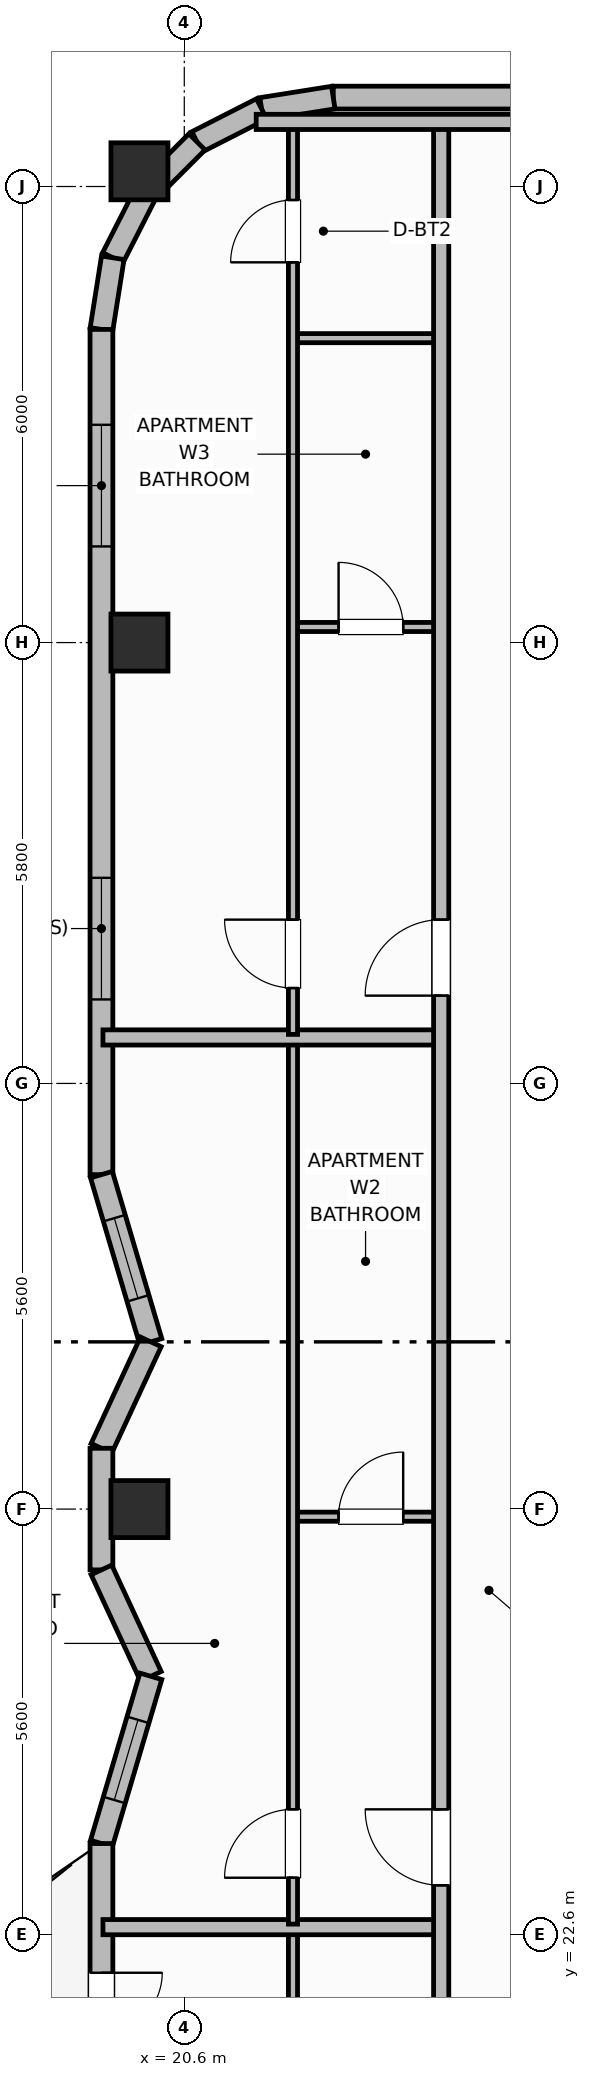
"""IFC4 building model, lengths in metres.
Left out: names, types, materials, properties, quantities, classifications, styles, units other than length and angle.
Written with IfcOpenShell. Run it as: python <this file> out.ifc"""

import sys

from ifc_helpers import new_model, si_unit, direction, frame, frame_2d, origin, origin_2d, place, context, subcontext, project, spatial, rectangle, extrude, element, fill, save


model = new_model("IFC4")
c1 = context("Model", 3, precision=1e-05, world=origin(), true_north=direction((0.0, 1.0)))
c2 = subcontext(c1, "Body", "Model", "MODEL_VIEW")
j1 = project(units=[si_unit("LENGTHUNIT", "METRE"), si_unit("PLANEANGLEUNIT", "RADIAN")], contexts=[c1])
p1 = place(None, origin())
s1 = spatial("IfcSite", under=j1, at=p1, CompositionType="ELEMENT")
p2 = place(p1, origin())
s2 = spatial("IfcBuilding", under=s1, at=p2, CompositionType="ELEMENT")
p3 = place(p2, frame((0.0, 0.0, 286.1)))
s3 = spatial("IfcBuildingStorey", under=s2, at=p3, CompositionType="ELEMENT", Elevation=286.1)
for number, where, z_axis, x_axis in (
    (1, (20.01, 28.2, 0.0), (0.0, 0.0, 1.0), (1.0, 0.0, 0.0)),
    (2, (20.01, 39.6, 0.0), (0.0, 0.0, 1.0), (1.0, 0.0, 0.0)),
    (3, (20.01, 45.8, 0.0), (0.0, 0.0, 1.0), (1.0, 0.0, 0.0)),
):
    element("IfcColumn", number, at=place(p3, frame(where, z_axis=z_axis, x_axis=x_axis)), inside=s3, PredefinedType="COLUMN", context=c2, shape_type="SweptSolid", body=[
        extrude(rectangle(XDim=0.75, YDim=0.75, at=origin_2d()), origin(), (0.0, 0.0, 1.0), 3.7),
    ])
p4 = place(p3, frame((55.84, 46.77, 0.0), z_axis=(0.0, 0.0, 1.0), x_axis=(-1.0, 0.0, 0.0)))
e4 = element("IfcWall", 4, at=p4, inside=s3, PredefinedType="SOLIDWALL", context=c2, shape_type="SweptSolid", body=[
    extrude(rectangle(XDim=33.28, YDim=0.3, at=frame_2d((16.64, 0.0))), origin(), (0.0, 0.0, 1.0), 2.73),
])
p5 = place(p4, frame((5.08, 0.0, 0.76)))
e5 = element("IfcOpeningElement", 5, at=p5, cuts=e4, PredefinedType="OPENING", context=c2, shape_type="SweptSolid", body=[
    extrude(rectangle(XDim=1.8, YDim=1.85, at=frame_2d((0.9, 0.925))), frame((0.0, 0.16, 0.0), z_axis=(0.0, -1.0, 0.0), x_axis=(1.0, 0.0, 0.0)), (0.0, 0.0, 1.0), 0.32),
])
p6 = place(p4, frame((8.633, 0.0, 0.76)))
e6 = element("IfcOpeningElement", 6, at=p6, cuts=e4, PredefinedType="OPENING", context=c2, shape_type="SweptSolid", body=[
    extrude(rectangle(XDim=1.8, YDim=1.85, at=frame_2d((0.9, 0.925))), frame((0.0, 0.16, 0.0), z_axis=(0.0, -1.0, 0.0), x_axis=(1.0, 0.0, 0.0)), (0.0, 0.0, 1.0), 0.32),
])
p7 = place(p4, frame((15.74, 0.0, 0.76)))
e7 = element("IfcOpeningElement", 7, at=p7, cuts=e4, PredefinedType="OPENING", context=c2, shape_type="SweptSolid", body=[
    extrude(rectangle(XDim=1.8, YDim=1.85, at=frame_2d((0.9, 0.925))), frame((0.0, 0.16, 0.0), z_axis=(0.0, -1.0, 0.0), x_axis=(1.0, 0.0, 0.0)), (0.0, 0.0, 1.0), 0.32),
])
p8 = place(p4, frame((22.847, 0.0, 0.76)))
e8 = element("IfcOpeningElement", 8, at=p8, cuts=e4, PredefinedType="OPENING", context=c2, shape_type="SweptSolid", body=[
    extrude(rectangle(XDim=1.8, YDim=1.85, at=frame_2d((0.9, 0.925))), frame((0.0, 0.16, 0.0), z_axis=(0.0, -1.0, 0.0), x_axis=(1.0, 0.0, 0.0)), (0.0, 0.0, 1.0), 0.32),
])
p9 = place(p4, frame((26.4, 0.0, 0.76)))
e9 = element("IfcOpeningElement", 9, at=p9, cuts=e4, PredefinedType="OPENING", context=c2, shape_type="SweptSolid", body=[
    extrude(rectangle(XDim=1.8, YDim=1.85, at=frame_2d((0.9, 0.925))), frame((0.0, 0.16, 0.0), z_axis=(0.0, -1.0, 0.0), x_axis=(1.0, 0.0, 0.0)), (0.0, 0.0, 1.0), 0.32),
])
p10 = place(p3, frame((22.56, 46.77, 0.0), z_axis=(0.0, 0.0, 1.0), x_axis=(-0.987669453596, -0.156553666304, 0.0)))
e10 = element("IfcWall", 10, at=p10, inside=s3, PredefinedType="SOLIDWALL", context=c2, shape_type="SweptSolid", body=[
    extrude(rectangle(XDim=0.954, YDim=0.3, at=frame_2d((0.477, 0.0))), origin(), (0.0, 0.0, 1.0), 2.73),
])
p11 = place(p3, frame((21.617, 46.621, 0.0), z_axis=(0.0, 0.0, 1.0), x_axis=(-0.891023873617, -0.45395644796, 0.0)))
e11 = element("IfcWall", 11, at=p11, inside=s3, PredefinedType="SOLIDWALL", context=c2, shape_type="SweptSolid", body=[
    extrude(rectangle(XDim=0.954, YDim=0.3, at=frame_2d((0.477, 0.0))), origin(), (0.0, 0.0, 1.0), 2.73),
])
p12 = place(p3, frame((20.767, 46.188, 0.0), z_axis=(0.0, 0.0, 1.0), x_axis=(-0.707106781187, -0.707106781187, 0.0)))
e12 = element("IfcWall", 12, at=p12, inside=s3, PredefinedType="SOLIDWALL", context=c2, shape_type="SweptSolid", body=[
    extrude(rectangle(XDim=0.954, YDim=0.3, at=frame_2d((0.477, 0.0))), origin(), (0.0, 0.0, 1.0), 2.73),
])
p13 = place(p3, frame((20.093, 45.513, 0.0), z_axis=(0.0, 0.0, 1.0), x_axis=(-0.454159573051, -0.890920356825, 0.0)))
e13 = element("IfcWall", 13, at=p13, inside=s3, PredefinedType="SOLIDWALL", context=c2, shape_type="SweptSolid", body=[
    extrude(rectangle(XDim=0.954, YDim=0.3, at=frame_2d((0.477, 0.0))), origin(), (0.0, 0.0, 1.0), 2.73),
])
p14 = place(p3, frame((19.659, 44.663, 0.0), z_axis=(0.0, 0.0, 1.0), x_axis=(-0.156304114255, -0.987708977314, 0.0)))
e14 = element("IfcWall", 14, at=p14, inside=s3, PredefinedType="SOLIDWALL", context=c2, shape_type="SweptSolid", body=[
    extrude(rectangle(XDim=0.954, YDim=0.3, at=frame_2d((0.477, 0.0))), origin(), (0.0, 0.0, 1.0), 2.73),
])
p15 = place(p3, frame((19.51, 43.72, 0.0), z_axis=(0.0, 0.0, 1.0), x_axis=(0.0, -1.0, 0.0)))
e15 = element("IfcWall", 15, at=p15, inside=s3, PredefinedType="SOLIDWALL", context=c2, shape_type="SweptSolid", body=[
    extrude(rectangle(XDim=11.12, YDim=0.3, at=frame_2d((5.56, 0.0))), origin(), (0.0, 0.0, 1.0), 2.73),
])
p16 = place(p15, frame((1.255, 0.0, 0.71)))
e16 = element("IfcOpeningElement", 16, at=p16, cuts=e15, PredefinedType="OPENING", context=c2, shape_type="SweptSolid", body=[
    extrude(rectangle(XDim=1.6, YDim=1.9, at=frame_2d((0.8, 0.95))), frame((0.0, 0.16, 0.0), z_axis=(0.0, -1.0, 0.0), x_axis=(1.0, 0.0, 0.0)), (0.0, 0.0, 1.0), 0.32),
])
p17 = place(p15, frame((7.215, 0.0, 0.71)))
e17 = element("IfcOpeningElement", 17, at=p17, cuts=e15, PredefinedType="OPENING", context=c2, shape_type="SweptSolid", body=[
    extrude(rectangle(XDim=1.6, YDim=1.9, at=frame_2d((0.8, 0.95))), frame((0.0, 0.16, 0.0), z_axis=(0.0, -1.0, 0.0), x_axis=(1.0, 0.0, 0.0)), (0.0, 0.0, 1.0), 0.32),
])
p18 = place(p3, frame((19.51, 32.6, 0.0), z_axis=(0.0, 0.0, 1.0), x_axis=(0.28328385701, -0.959036107953, 0.0)))
e18 = element("IfcWall", 18, at=p18, inside=s3, PredefinedType="SOLIDWALL", context=c2, shape_type="SweptSolid", body=[
    extrude(rectangle(XDim=2.294, YDim=0.3, at=frame_2d((1.147, 0.0))), origin(), (0.0, 0.0, 1.0), 2.73),
])
p19 = place(p18, frame((0.597, 0.0, 0.92)))
e19 = element("IfcOpeningElement", 19, at=p19, cuts=e18, PredefinedType="OPENING", context=c2, shape_type="SweptSolid", body=[
    extrude(rectangle(XDim=1.1, YDim=1.65, at=frame_2d((0.55, 0.825))), frame((0.0, 0.16, 0.0), z_axis=(0.0, -1.0, 0.0), x_axis=(1.0, 0.0, 0.0)), (0.0, 0.0, 1.0), 0.32),
])
p20 = place(p3, frame((20.16, 30.4, 0.0), z_axis=(0.0, 0.0, 1.0), x_axis=(-0.421083420882, -0.907021914101, 0.0)))
e20 = element("IfcWall", 20, at=p20, inside=s3, PredefinedType="SOLIDWALL", context=c2, shape_type="SweptSolid", body=[
    extrude(rectangle(XDim=1.543, YDim=0.3, at=frame_2d((0.772, 0.0))), origin(), (0.0, 0.0, 1.0), 2.73),
])
p21 = place(p3, frame((19.51, 29.0, 0.0), z_axis=(0.0, 0.0, 1.0), x_axis=(0.0, -1.0, 0.0)))
e21 = element("IfcWall", 21, at=p21, inside=s3, PredefinedType="SOLIDWALL", context=c2, shape_type="SweptSolid", body=[
    extrude(rectangle(XDim=1.6, YDim=0.3, at=frame_2d((0.8, 0.0))), origin(), (0.0, 0.0, 1.0), 2.73),
])
p22 = place(p3, frame((19.51, 27.4, 0.0), z_axis=(0.0, 0.0, 1.0), x_axis=(0.421083420882, -0.907021914101, 0.0)))
e22 = element("IfcWall", 22, at=p22, inside=s3, PredefinedType="SOLIDWALL", context=c2, shape_type="SweptSolid", body=[
    extrude(rectangle(XDim=1.543, YDim=0.3, at=frame_2d((0.772, 0.0))), origin(), (0.0, 0.0, 1.0), 2.73),
])
p23 = place(p3, frame((20.16, 26.0, 0.0), z_axis=(0.0, 0.0, 1.0), x_axis=(-0.283312771328, -0.959027566654, 0.0)))
e23 = element("IfcWall", 23, at=p23, inside=s3, PredefinedType="SOLIDWALL", context=c2, shape_type="SweptSolid", body=[
    extrude(rectangle(XDim=2.294, YDim=0.3, at=frame_2d((1.147, 0.0))), origin(), (0.0, 0.0, 1.0), 2.73),
])
p24 = place(p23, frame((0.597, 0.0, 0.92)))
e24 = element("IfcOpeningElement", 24, at=p24, cuts=e23, PredefinedType="OPENING", context=c2, shape_type="SweptSolid", body=[
    extrude(rectangle(XDim=1.1, YDim=1.65, at=frame_2d((0.55, 0.825))), frame((0.0, 0.16, 0.0), z_axis=(0.0, -1.0, 0.0), x_axis=(1.0, 0.0, 0.0)), (0.0, 0.0, 1.0), 0.32),
])
p25 = place(p3, frame((19.51, 23.8, 0.0), z_axis=(0.0, 0.0, 1.0), x_axis=(0.0, -1.0, 0.0)))
e25 = element("IfcWall", 25, at=p25, inside=s3, PredefinedType="SOLIDWALL", context=c2, shape_type="SweptSolid", body=[
    extrude(rectangle(XDim=11.12, YDim=0.3, at=frame_2d((5.56, 0.0))), origin(), (0.0, 0.0, 1.0), 2.73),
])
p26 = place(p25, frame((1.7, 0.0, 0.0)))
e26 = element("IfcOpeningElement", 26, at=p26, cuts=e25, PredefinedType="OPENING", context=c2, shape_type="SweptSolid", body=[
    extrude(rectangle(XDim=1.6, YDim=2.1, at=frame_2d((0.8, 1.05))), frame((0.0, 0.16, 0.0), z_axis=(0.0, -1.0, 0.0), x_axis=(1.0, 0.0, 0.0)), (0.0, 0.0, 1.0), 0.32),
])
p27 = place(p25, frame((4.16, 0.0, 0.76)))
e27 = element("IfcOpeningElement", 27, at=p27, cuts=e25, PredefinedType="OPENING", context=c2, shape_type="SweptSolid", body=[
    extrude(rectangle(XDim=1.4, YDim=1.85, at=frame_2d((0.7, 0.925))), frame((0.0, 0.16, 0.0), z_axis=(0.0, -1.0, 0.0), x_axis=(1.0, 0.0, 0.0)), (0.0, 0.0, 1.0), 0.32),
])
p28 = place(p25, frame((8.483, 0.0, 0.76)))
e28 = element("IfcOpeningElement", 28, at=p28, cuts=e25, PredefinedType="OPENING", context=c2, shape_type="SweptSolid", body=[
    extrude(rectangle(XDim=1.4, YDim=1.85, at=frame_2d((0.7, 0.925))), frame((0.0, 0.16, 0.0), z_axis=(0.0, -1.0, 0.0), x_axis=(1.0, 0.0, 0.0)), (0.0, 0.0, 1.0), 0.32),
])
p29 = place(p3, frame((22.03, 9.99, 0.0), z_axis=(0.0, 0.0, 1.0), x_axis=(0.0, 1.0, 0.0)))
e29 = element("IfcWall", 29, at=p29, inside=s3, PredefinedType="PARTITIONING", context=c2, shape_type="SweptSolid", body=[
    extrude(rectangle(XDim=12.67, YDim=0.12, at=frame_2d((6.335, 0.0))), origin(), (0.0, 0.0, 1.0), 2.56),
])
p30 = place(p29, frame((0.41, 0.0, 0.0)))
e30 = element("IfcOpeningElement", 30, at=p30, cuts=e29, PredefinedType="OPENING", context=c2, shape_type="SweptSolid", body=[
    extrude(rectangle(XDim=0.9, YDim=2.1, at=frame_2d((0.45, 1.05))), frame((0.0, 0.07, 0.0), z_axis=(0.0, -1.0, 0.0), x_axis=(1.0, 0.0, 0.0)), (0.0, 0.0, 1.0), 0.14),
])
p31 = place(p29, frame((10.51, 0.0, 0.0)))
e31 = element("IfcOpeningElement", 31, at=p31, cuts=e29, PredefinedType="OPENING", context=c2, shape_type="SweptSolid", body=[
    extrude(rectangle(XDim=0.82, YDim=2.08, at=frame_2d((0.41, 1.04))), frame((0.0, 0.07, 0.0), z_axis=(0.0, -1.0, 0.0), x_axis=(1.0, 0.0, 0.0)), (0.0, 0.0, 1.0), 0.14),
])
p32 = place(p3, frame((19.53, 22.7, 0.0), z_axis=(0.0, 0.0, 1.0), x_axis=(1.0, 0.0, 0.0)))
e32 = element("IfcWall", 32, at=p32, inside=s3, PredefinedType="PARTITIONING", context=c2, shape_type="SweptSolid", body=[
    extrude(rectangle(XDim=4.45, YDim=0.2, at=frame_2d((2.225, 0.0))), origin(), (0.0, 0.0, 1.0), 2.56),
])
p33 = place(p3, frame((22.03, 28.1, 0.0), z_axis=(0.0, 0.0, 1.0), x_axis=(1.0, 0.0, 0.0)))
e33 = element("IfcWall", 33, at=p33, inside=s3, PredefinedType="PARTITIONING", context=c2, shape_type="SweptSolid", body=[
    extrude(rectangle(XDim=1.95, YDim=0.12, at=frame_2d((0.975, 0.0))), origin(), (0.0, 0.0, 1.0), 2.56),
])
p34 = place(p33, frame((0.6, 0.0, 0.0)))
e34 = element("IfcOpeningElement", 34, at=p34, cuts=e33, PredefinedType="OPENING", context=c2, shape_type="SweptSolid", body=[
    extrude(rectangle(XDim=0.85, YDim=2.1, at=frame_2d((0.425, 1.05))), frame((0.0, 0.07, 0.0), z_axis=(0.0, -1.0, 0.0), x_axis=(1.0, 0.0, 0.0)), (0.0, 0.0, 1.0), 0.14),
])
p35 = place(p3, frame((22.03, 22.74, 0.0), z_axis=(0.0, 0.0, 1.0), x_axis=(0.0, 1.0, 0.0)))
e35 = element("IfcWall", 35, at=p35, inside=s3, PredefinedType="PARTITIONING", context=c2, shape_type="SweptSolid", body=[
    extrude(rectangle(XDim=11.625, YDim=0.12, at=frame_2d((5.812, 0.0))), origin(), (0.0, 0.0, 1.0), 2.56),
])
p36 = place(p35, frame((0.61, 0.0, 0.0)))
e36 = element("IfcOpeningElement", 36, at=p36, cuts=e35, PredefinedType="OPENING", context=c2, shape_type="SweptSolid", body=[
    extrude(rectangle(XDim=0.9, YDim=2.1, at=frame_2d((0.45, 1.05))), frame((0.0, 0.07, 0.0), z_axis=(0.0, -1.0, 0.0), x_axis=(1.0, 0.0, 0.0)), (0.0, 0.0, 1.0), 0.14),
])
p37 = place(p3, frame((19.53, 34.405, 0.0), z_axis=(0.0, 0.0, 1.0), x_axis=(1.0, 0.0, 0.0)))
e37 = element("IfcWall", 37, at=p37, inside=s3, PredefinedType="PARTITIONING", context=c2, shape_type="SweptSolid", body=[
    extrude(rectangle(XDim=4.45, YDim=0.2, at=frame_2d((2.225, 0.0))), origin(), (0.0, 0.0, 1.0), 2.56),
])
p38 = place(p3, frame((22.03, 39.805, 0.0), z_axis=(0.0, 0.0, 1.0), x_axis=(1.0, 0.0, 0.0)))
e38 = element("IfcWall", 38, at=p38, inside=s3, PredefinedType="PARTITIONING", context=c2, shape_type="SweptSolid", body=[
    extrude(rectangle(XDim=1.95, YDim=0.12, at=frame_2d((0.975, 0.0))), origin(), (0.0, 0.0, 1.0), 2.56),
])
p39 = place(p38, frame((0.6, 0.0, 0.0)))
e39 = element("IfcOpeningElement", 39, at=p39, cuts=e38, PredefinedType="OPENING", context=c2, shape_type="SweptSolid", body=[
    extrude(rectangle(XDim=0.85, YDim=2.1, at=frame_2d((0.425, 1.05))), frame((0.0, 0.07, 0.0), z_axis=(0.0, -1.0, 0.0), x_axis=(1.0, 0.0, 0.0)), (0.0, 0.0, 1.0), 0.14),
])
p40 = place(p3, frame((22.03, 43.605, 0.0), z_axis=(0.0, 0.0, 1.0), x_axis=(1.0, 0.0, 0.0)))
e40 = element("IfcWall", 40, at=p40, inside=s3, PredefinedType="PARTITIONING", context=c2, shape_type="SweptSolid", body=[
    extrude(rectangle(XDim=1.95, YDim=0.12, at=frame_2d((0.975, 0.0))), origin(), (0.0, 0.0, 1.0), 2.56),
])
p41 = place(p3, frame((22.03, 34.445, 0.0), z_axis=(0.0, 0.0, 1.0), x_axis=(0.0, 1.0, 0.0)))
e41 = element("IfcWall", 41, at=p41, inside=s3, PredefinedType="PARTITIONING", context=c2, shape_type="SweptSolid", body=[
    extrude(rectangle(XDim=11.965, YDim=0.12, at=frame_2d((5.982, 0.0))), origin(), (0.0, 0.0, 1.0), 2.56),
])
p42 = place(p41, frame((0.61, 0.0, 0.0)))
e42 = element("IfcOpeningElement", 42, at=p42, cuts=e41, PredefinedType="OPENING", context=c2, shape_type="SweptSolid", body=[
    extrude(rectangle(XDim=0.9, YDim=2.1, at=frame_2d((0.45, 1.05))), frame((0.0, 0.07, 0.0), z_axis=(0.0, -1.0, 0.0), x_axis=(1.0, 0.0, 0.0)), (0.0, 0.0, 1.0), 0.14),
])
p43 = place(p41, frame((10.157, 0.0, 0.0)))
e43 = element("IfcOpeningElement", 43, at=p43, cuts=e41, PredefinedType="OPENING", context=c2, shape_type="SweptSolid", body=[
    extrude(rectangle(XDim=0.82, YDim=2.08, at=frame_2d((0.41, 1.04))), frame((0.0, 0.07, 0.0), z_axis=(0.0, -1.0, 0.0), x_axis=(1.0, 0.0, 0.0)), (0.0, 0.0, 1.0), 0.14),
])
p44 = place(p3, frame((23.98, 9.95, 0.0), z_axis=(0.0, 0.0, 1.0), x_axis=(0.0, 1.0, 0.0)))
e44 = element("IfcWall", 44, at=p44, inside=s3, PredefinedType="PARTITIONING", context=c2, shape_type="SweptSolid", body=[
    extrude(rectangle(XDim=36.5, YDim=0.2, at=frame_2d((18.25, 0.0))), origin(), (0.0, 0.0, 1.0), 2.56),
])
p45 = place(p44, frame((3.25, 0.0, 0.0)))
e45 = element("IfcOpeningElement", 45, at=p45, cuts=e44, PredefinedType="OPENING", context=c2, shape_type="SweptSolid", body=[
    extrude(rectangle(XDim=1.0, YDim=2.15, at=frame_2d((0.5, 1.075))), frame((0.0, 0.11, 0.0), z_axis=(0.0, -1.0, 0.0), x_axis=(1.0, 0.0, 0.0)), (0.0, 0.0, 1.0), 0.22),
])
p46 = place(p44, frame((13.3, 0.0, 0.0)))
e46 = element("IfcOpeningElement", 46, at=p46, cuts=e44, PredefinedType="OPENING", context=c2, shape_type="SweptSolid", body=[
    extrude(rectangle(XDim=1.0, YDim=2.15, at=frame_2d((0.5, 1.075))), frame((0.0, 0.11, 0.0), z_axis=(0.0, -1.0, 0.0), x_axis=(1.0, 0.0, 0.0)), (0.0, 0.0, 1.0), 0.22),
])
p47 = place(p44, frame((25.005, 0.0, 0.0)))
e47 = element("IfcOpeningElement", 47, at=p47, cuts=e44, PredefinedType="OPENING", context=c2, shape_type="SweptSolid", body=[
    extrude(rectangle(XDim=1.0, YDim=2.15, at=frame_2d((0.5, 1.075))), frame((0.0, 0.11, 0.0), z_axis=(0.0, -1.0, 0.0), x_axis=(1.0, 0.0, 0.0)), (0.0, 0.0, 1.0), 0.22),
])
p48 = place(p3, frame((21.546, 46.45, 0.0), z_axis=(0.0, 0.0, 1.0), x_axis=(1.0, 0.0, 0.0)))
e48 = element("IfcWall", 48, at=p48, inside=s3, PredefinedType="PARTITIONING", context=c2, shape_type="SweptSolid", body=[
    extrude(rectangle(XDim=3.754, YDim=0.2, at=frame_2d((1.877, 0.0))), origin(), (0.0, 0.0, 1.0), 2.56),
])
p49 = place(p16, origin())
e49 = element("IfcWindow", 49, at=p49, inside=s3, PartitioningType="SINGLE_PANEL", PredefinedType="WINDOW", context=c2, shape_type="SweptSolid", body=[
    extrude(rectangle(XDim=1.6, YDim=1.9, at=frame_2d((0.8, 0.95))), frame((0.0, 0.03, 0.0), z_axis=(0.0, -1.0, 0.0), x_axis=(1.0, 0.0, 0.0)), (0.0, 0.0, 1.0), 0.06),
])
fill(e16, e49)
p50 = place(p17, origin())
e50 = element("IfcWindow", 50, at=p50, inside=s3, PartitioningType="SINGLE_PANEL", PredefinedType="WINDOW", context=c2, shape_type="SweptSolid", body=[
    extrude(rectangle(XDim=1.6, YDim=1.9, at=frame_2d((0.8, 0.95))), frame((0.0, 0.03, 0.0), z_axis=(0.0, -1.0, 0.0), x_axis=(1.0, 0.0, 0.0)), (0.0, 0.0, 1.0), 0.06),
])
fill(e17, e50)
p51 = place(p19, origin())
e51 = element("IfcWindow", 51, at=p51, inside=s3, PartitioningType="SINGLE_PANEL", PredefinedType="WINDOW", context=c2, shape_type="SweptSolid", body=[
    extrude(rectangle(XDim=1.1, YDim=1.65, at=frame_2d((0.55, 0.825))), frame((0.0, 0.03, 0.0), z_axis=(0.0, -1.0, 0.0), x_axis=(1.0, 0.0, 0.0)), (0.0, 0.0, 1.0), 0.06),
])
fill(e19, e51)
p52 = place(p24, origin())
e52 = element("IfcWindow", 52, at=p52, inside=s3, PartitioningType="SINGLE_PANEL", PredefinedType="WINDOW", context=c2, shape_type="SweptSolid", body=[
    extrude(rectangle(XDim=1.1, YDim=1.65, at=frame_2d((0.55, 0.825))), frame((0.0, 0.03, 0.0), z_axis=(0.0, -1.0, 0.0), x_axis=(1.0, 0.0, 0.0)), (0.0, 0.0, 1.0), 0.06),
])
fill(e24, e52)
p53 = place(p26, origin())
e53 = element("IfcDoor", 53, at=p53, inside=s3, OperationType="DOUBLE_DOOR_SINGLE_SWING", PredefinedType="DOOR", context=c2, shape_type="SweptSolid", body=[
    extrude(rectangle(XDim=1.6, YDim=2.1, at=frame_2d((0.8, 1.05))), frame((0.0, 0.025, 0.0), z_axis=(0.0, -1.0, 0.0), x_axis=(1.0, 0.0, 0.0)), (0.0, 0.0, 1.0), 0.05),
])
fill(e26, e53)
p54 = place(p34, origin())
e54 = element("IfcDoor", 54, at=p54, inside=s3, OperationType="SINGLE_SWING_RIGHT", PredefinedType="DOOR", context=c2, shape_type="SweptSolid", body=[
    extrude(rectangle(XDim=0.85, YDim=2.1, at=frame_2d((0.425, 1.05))), frame((0.0, 0.025, 0.0), z_axis=(0.0, -1.0, 0.0), x_axis=(1.0, 0.0, 0.0)), (0.0, 0.0, 1.0), 0.05),
])
fill(e34, e54)
p55 = place(p36, origin())
e55 = element("IfcDoor", 55, at=p55, inside=s3, OperationType="SINGLE_SWING_LEFT", PredefinedType="DOOR", context=c2, shape_type="SweptSolid", body=[
    extrude(rectangle(XDim=0.9, YDim=2.1, at=frame_2d((0.45, 1.05))), frame((0.0, 0.025, 0.0), z_axis=(0.0, -1.0, 0.0), x_axis=(1.0, 0.0, 0.0)), (0.0, 0.0, 1.0), 0.05),
])
fill(e36, e55)
p56 = place(p39, origin())
e56 = element("IfcDoor", 56, at=p56, inside=s3, OperationType="SINGLE_SWING_LEFT", PredefinedType="DOOR", context=c2, shape_type="SweptSolid", body=[
    extrude(rectangle(XDim=0.85, YDim=2.1, at=frame_2d((0.425, 1.05))), frame((0.0, 0.025, 0.0), z_axis=(0.0, -1.0, 0.0), x_axis=(1.0, 0.0, 0.0)), (0.0, 0.0, 1.0), 0.05),
])
fill(e39, e56)
p57 = place(p42, origin())
e57 = element("IfcDoor", 57, at=p57, inside=s3, OperationType="SINGLE_SWING_RIGHT", PredefinedType="DOOR", context=c2, shape_type="SweptSolid", body=[
    extrude(rectangle(XDim=0.9, YDim=2.1, at=frame_2d((0.45, 1.05))), frame((0.0, 0.025, 0.0), z_axis=(0.0, -1.0, 0.0), x_axis=(1.0, 0.0, 0.0)), (0.0, 0.0, 1.0), 0.05),
])
fill(e42, e57)
p58 = place(p43, origin())
e58 = element("IfcDoor", 58, at=p58, inside=s3, OperationType="SINGLE_SWING_LEFT", PredefinedType="DOOR", context=c2, shape_type="SweptSolid", body=[
    extrude(rectangle(XDim=0.82, YDim=2.08, at=frame_2d((0.41, 1.04))), frame((0.0, 0.025, 0.0), z_axis=(0.0, -1.0, 0.0), x_axis=(1.0, 0.0, 0.0)), (0.0, 0.0, 1.0), 0.05),
])
fill(e43, e58)
p59 = place(p46, origin())
e59 = element("IfcDoor", 59, at=p59, inside=s3, OperationType="SINGLE_SWING_RIGHT", PredefinedType="DOOR", context=c2, shape_type="SweptSolid", body=[
    extrude(rectangle(XDim=1.0, YDim=2.15, at=frame_2d((0.5, 1.075))), frame((0.0, 0.025, 0.0), z_axis=(0.0, -1.0, 0.0), x_axis=(1.0, 0.0, 0.0)), (0.0, 0.0, 1.0), 0.05),
])
fill(e46, e59)
p60 = place(p47, origin())
e60 = element("IfcDoor", 60, at=p60, inside=s3, OperationType="SINGLE_SWING_LEFT", PredefinedType="DOOR", context=c2, shape_type="SweptSolid", body=[
    extrude(rectangle(XDim=1.0, YDim=2.15, at=frame_2d((0.5, 1.075))), frame((0.0, 0.025, 0.0), z_axis=(0.0, -1.0, 0.0), x_axis=(1.0, 0.0, 0.0)), (0.0, 0.0, 1.0), 0.05),
])
fill(e47, e60)
save(model, sys.argv[1])
